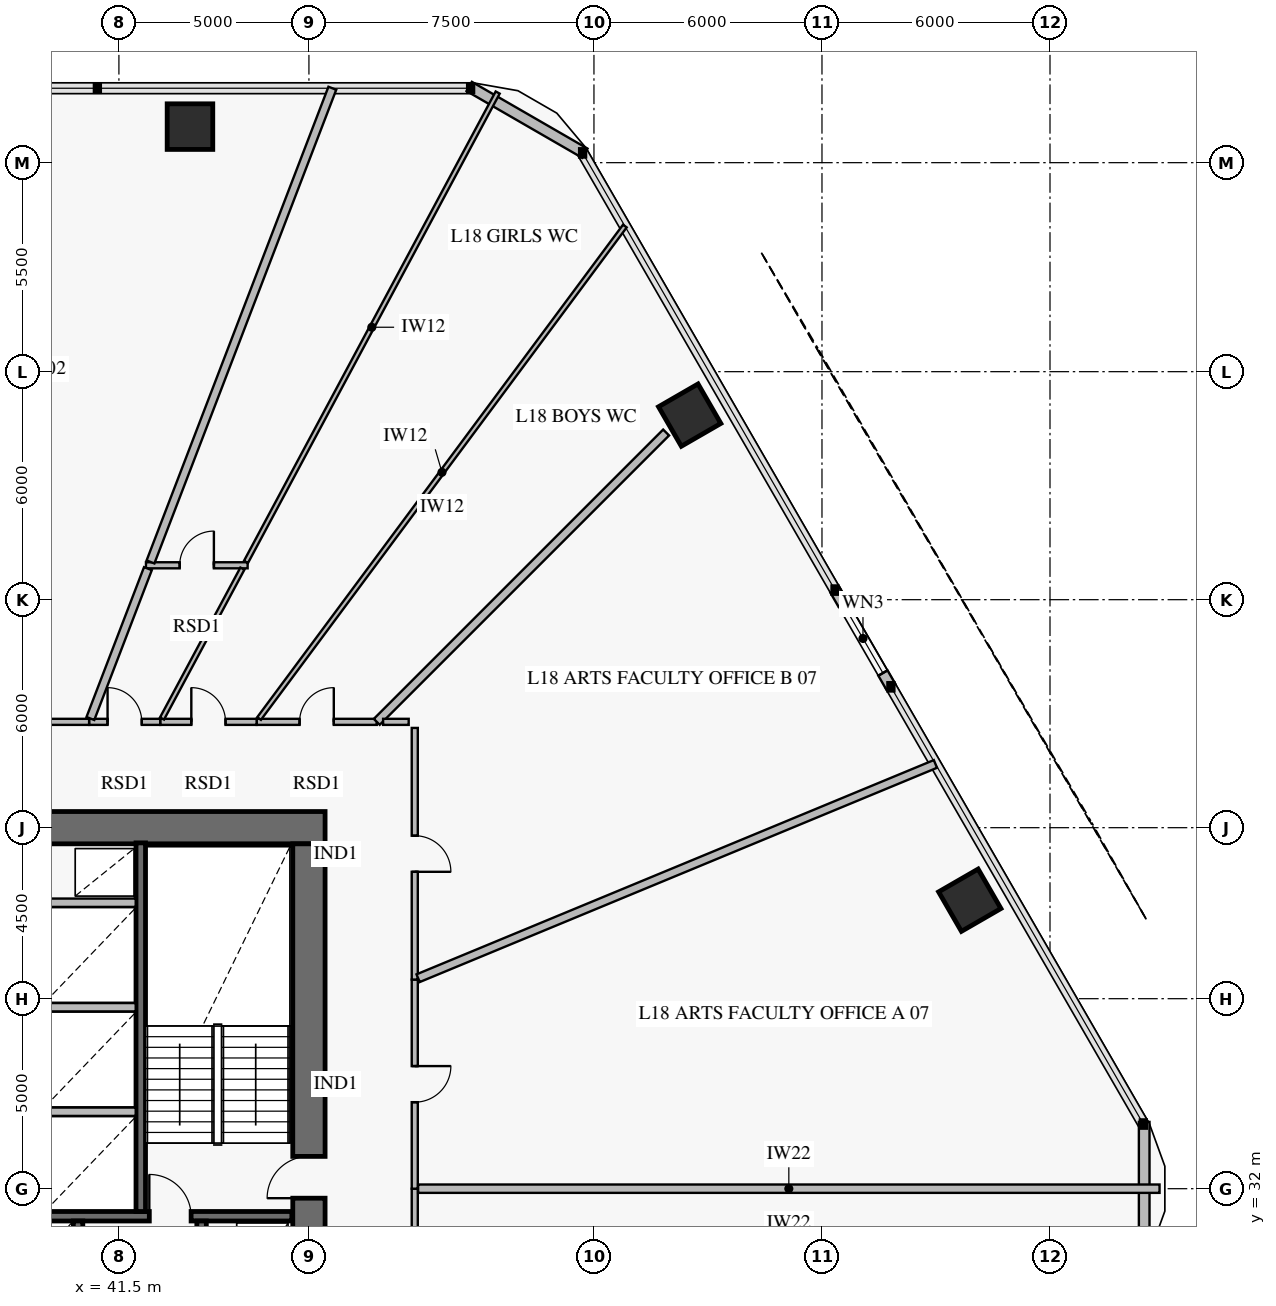
"""IFC4 building model, lengths in metres.
Left out: names, types, materials, properties, quantities, classifications, styles, units other than length and angle.
Written with IfcOpenShell. Run it as: python <this file> out.ifc"""

import sys

from ifc_helpers import new_model, si_unit, direction, frame, frame_2d, origin, origin_2d, place, context, subcontext, project, spatial, rectangle, extrude, element, fill, save


model = new_model("IFC4")
c1 = context("Model", 3, precision=1e-05, world=origin(), true_north=direction((0.0, 1.0)))
c2 = subcontext(c1, "Body", "Model", "MODEL_VIEW")
j1 = project(units=[si_unit("LENGTHUNIT", "METRE"), si_unit("PLANEANGLEUNIT", "RADIAN")], contexts=[c1])
p1 = place(None, origin())
s1 = spatial("IfcSite", under=j1, at=p1, CompositionType="ELEMENT")
p2 = place(p1, origin())
s2 = spatial("IfcBuilding", under=s1, at=p2, CompositionType="ELEMENT")
p3 = place(p2, frame((0.0, 0.0, 75.0)))
s3 = spatial("IfcBuildingStorey", under=s2, at=p3, CompositionType="ELEMENT", Elevation=75.0)
p4 = place(p3, frame((46.925, 41.5, 0.0), z_axis=(0.0, 0.0, 1.0), x_axis=(-1.0, 0.0, 0.0)))
e1 = element("IfcWall", 1, at=p4, inside=s3, PredefinedType="SHEAR", context=c2, shape_type="SweptSolid", body=[
    extrude(rectangle(XDim=7.975, YDim=0.85, at=frame_2d((3.988, 0.0))), origin(), (0.0, 0.0, 1.0), 4.2),
])
p5 = place(p3, frame((46.5, 22.925, 0.0), z_axis=(0.0, 0.0, 1.0), x_axis=(0.0, 1.0, 0.0)))
e2 = element("IfcWall", 2, at=p5, inside=s3, PredefinedType="SHEAR", context=c2, shape_type="SweptSolid", body=[
    extrude(rectangle(XDim=18.15, YDim=0.85, at=frame_2d((9.075, 0.0))), origin(), (0.0, 0.0, 1.0), 4.2),
])
p6 = place(p5, frame((8.825, 0.0, 0.0)))
e3 = element("IfcOpeningElement", 3, at=p6, cuts=e2, PredefinedType="OPENING", context=c2, shape_type="SweptSolid", body=[
    extrude(rectangle(XDim=1.1, YDim=2.15, at=frame_2d((0.55, 1.075))), frame((0.0, 0.437, 0.0), z_axis=(0.0, -1.0, 0.0), x_axis=(1.0, 0.0, 0.0)), (0.0, 0.0, 1.0), 0.874),
])
for number, where, z_axis, x_axis in (
    (4, (63.889, 39.592, 0.0), (0.0, 0.0, 1.0), (-0.5, 0.866, 0.0)),
    (5, (56.519, 52.357, 0.0), (0.0, 0.0, 1.0), (-0.5, 0.866, 0.0)),
    (6, (43.37, 59.948, 0.0), (0.0, 0.0, 1.0), (-1.0, 0.0, 0.0)),
):
    element("IfcColumn", number, at=place(p3, frame(where, z_axis=z_axis, x_axis=x_axis)), inside=s3, PredefinedType="COLUMN", context=c2, shape_type="SweptSolid", body=[
        extrude(rectangle(XDim=1.2, YDim=1.2, at=origin_2d()), origin(), (0.0, 0.0, 1.0), 3.92),
    ])
p7 = place(p3, frame((50.717, 61.006, 0.0), z_axis=(0.0, 0.0, 1.0), x_axis=(0.866007452331, -0.500031091541, 0.0)))
e7 = element("IfcWall", 7, at=p7, inside=s3, PredefinedType="SOLIDWALL", context=c2, shape_type="SweptSolid", body=[
    extrude(rectangle(XDim=3.515, YDim=0.28, at=frame_2d((1.757, 0.0))), origin(), (0.0, 0.0, 1.0), 3.92),
])
p8 = place(p3, frame((60.344, 47.752, 0.0), z_axis=(0.0, 0.0, 1.0), x_axis=(0.500024377727, -0.866011328839, 0.0)))
e8 = element("IfcWall", 8, at=p8, inside=s3, PredefinedType="SOLIDWALL", context=c2, shape_type="SweptSolid", body=[
    extrude(rectangle(XDim=2.94, YDim=0.28, at=frame_2d((1.47, 0.0))), origin(), (0.0, 0.0, 1.0), 3.92),
])
p9 = place(p8, frame((0.42, 0.0, 0.7)))
e9 = element("IfcOpeningElement", 9, at=p9, cuts=e8, PredefinedType="OPENING", context=c2, shape_type="SweptSolid", body=[
    extrude(rectangle(XDim=2.1, YDim=1.5, at=frame_2d((1.05, 0.75))), frame((0.0, 0.152, 0.0), z_axis=(0.0, -1.0, 0.0), x_axis=(1.0, 0.0, 0.0)), (0.0, 0.0, 1.0), 0.304),
])
p10 = place(p3, frame((68.479, 33.758, 0.0), z_axis=(0.0, 0.0, 1.0), x_axis=(0.0, -1.0, 0.0)))
e10 = element("IfcWall", 10, at=p10, inside=s3, PredefinedType="SOLIDWALL", context=c2, shape_type="SweptSolid", body=[
    extrude(rectangle(XDim=3.515, YDim=0.28, at=frame_2d((1.758, 0.0))), origin(), (0.0, 0.0, 1.0), 3.92),
])
p11 = place(p3, frame((25.95, 31.275, 0.0), z_axis=(0.0, 0.0, 1.0), x_axis=(1.0, 0.0, 0.0)))
e11 = element("IfcWall", 11, at=p11, inside=s3, PredefinedType="SOLIDWALL", context=c2, shape_type="SweptSolid", body=[
    extrude(rectangle(XDim=20.1, YDim=0.25, at=frame_2d((10.05, 0.0))), origin(), (0.0, 0.0, 1.0), 4.2),
])
p12 = place(p11, frame((2.6, 0.0, 0.0)))
e12 = element("IfcOpeningElement", 12, at=p12, cuts=e11, PredefinedType="OPENING", context=c2, shape_type="SweptSolid", body=[
    extrude(rectangle(XDim=1.1, YDim=2.15, at=frame_2d((0.55, 1.075))), frame((0.0, 0.137, 0.0), z_axis=(0.0, -1.0, 0.0), x_axis=(1.0, 0.0, 0.0)), (0.0, 0.0, 1.0), 0.274),
])
p13 = place(p11, frame((10.6, 0.0, 0.0)))
e13 = element("IfcOpeningElement", 13, at=p13, cuts=e11, PredefinedType="OPENING", context=c2, shape_type="SweptSolid", body=[
    extrude(rectangle(XDim=1.1, YDim=2.15, at=frame_2d((0.55, 1.075))), frame((0.0, 0.137, 0.0), z_axis=(0.0, -1.0, 0.0), x_axis=(1.0, 0.0, 0.0)), (0.0, 0.0, 1.0), 0.274),
])
p14 = place(p11, frame((16.35, 0.0, 0.0)))
e14 = element("IfcOpeningElement", 14, at=p14, cuts=e11, PredefinedType="OPENING", context=c2, shape_type="SweptSolid", body=[
    extrude(rectangle(XDim=1.1, YDim=2.15, at=frame_2d((0.55, 1.075))), frame((0.0, 0.137, 0.0), z_axis=(0.0, -1.0, 0.0), x_axis=(1.0, 0.0, 0.0)), (0.0, 0.0, 1.0), 0.274),
])
p15 = place(p3, frame((42.075, 31.4, 0.0), z_axis=(0.0, 0.0, 1.0), x_axis=(0.0, 1.0, 0.0)))
e15 = element("IfcWall", 15, at=p15, inside=s3, PredefinedType="SOLIDWALL", context=c2, shape_type="SweptSolid", body=[
    extrude(rectangle(XDim=9.7, YDim=0.25, at=frame_2d((4.85, 0.0))), origin(), (0.0, 0.0, 1.0), 4.2),
])
p16 = place(p3, frame((40.425, 22.95, 0.0), z_axis=(0.0, 0.0, 1.0), x_axis=(0.0, 1.0, 0.0)))
e16 = element("IfcWall", 16, at=p16, inside=s3, PredefinedType="SOLIDWALL", context=c2, shape_type="SweptSolid", body=[
    extrude(rectangle(XDim=8.2, YDim=0.25, at=frame_2d((4.1, 0.0))), origin(), (0.0, 0.0, 1.0), 4.2),
])
p17 = place(p3, frame((43.675, 22.95, 0.0), z_axis=(0.0, 0.0, 1.0), x_axis=(0.0, 1.0, 0.0)))
e17 = element("IfcWall", 17, at=p17, inside=s3, PredefinedType="SOLIDWALL", context=c2, shape_type="SweptSolid", body=[
    extrude(rectangle(XDim=8.2, YDim=0.25, at=frame_2d((4.1, 0.0))), origin(), (0.0, 0.0, 1.0), 4.2),
])
p18 = place(p17, frame((0.75, 0.0, 0.0)))
e18 = element("IfcOpeningElement", 18, at=p18, cuts=e17, PredefinedType="OPENING", context=c2, shape_type="SweptSolid", body=[
    extrude(rectangle(XDim=1.3, YDim=2.3, at=frame_2d((0.65, 1.15))), frame((0.0, 0.137, 0.0), z_axis=(0.0, -1.0, 0.0), x_axis=(1.0, 0.0, 0.0)), (0.0, 0.0, 1.0), 0.274),
])
p19 = place(p17, frame((3.7, 0.0, 0.0)))
e19 = element("IfcOpeningElement", 19, at=p19, cuts=e17, PredefinedType="OPENING", context=c2, shape_type="SweptSolid", body=[
    extrude(rectangle(XDim=1.3, YDim=2.3, at=frame_2d((0.65, 1.15))), frame((0.0, 0.137, 0.0), z_axis=(0.0, -1.0, 0.0), x_axis=(1.0, 0.0, 0.0)), (0.0, 0.0, 1.0), 0.274),
])
p20 = place(p17, frame((6.62, 0.0, 0.0)))
e20 = element("IfcOpeningElement", 20, at=p20, cuts=e17, PredefinedType="OPENING", context=c2, shape_type="SweptSolid", body=[
    extrude(rectangle(XDim=0.9, YDim=2.1, at=frame_2d((0.45, 1.05))), frame((0.0, 0.137, 0.0), z_axis=(0.0, -1.0, 0.0), x_axis=(1.0, 0.0, 0.0)), (0.0, 0.0, 1.0), 0.274),
])
p21 = place(p3, frame((48.285, 44.285, 0.0), z_axis=(0.0, 0.0, 1.0), x_axis=(-1.0, 0.0, 0.0)))
e21 = element("IfcWall", 21, at=p21, inside=s3, PredefinedType="PARTITIONING", context=c2, shape_type="SweptSolid", body=[
    extrude(rectangle(XDim=3.161, YDim=0.16, at=frame_2d((1.581, 0.0))), origin(), (0.0, 0.0, 1.0), 3.22),
])
p22 = place(p21, frame((1.131, 0.0, 0.0)))
e22 = element("IfcOpeningElement", 22, at=p22, cuts=e21, PredefinedType="OPENING", context=c2, shape_type="SweptSolid", body=[
    extrude(rectangle(XDim=0.9, YDim=2.1, at=frame_2d((0.45, 1.05))), frame((0.0, 0.092, 0.0), z_axis=(0.0, -1.0, 0.0), x_axis=(1.0, 0.0, 0.0)), (0.0, 0.0, 1.0), 0.184),
])
p23 = place(p3, frame((45.124, 44.285, 0.0), z_axis=(0.0, 0.0, 1.0), x_axis=(-1.0, 0.0, 0.0)))
e23 = element("IfcWall", 23, at=p23, inside=s3, PredefinedType="PARTITIONING", context=c2, shape_type="SweptSolid", body=[
    extrude(rectangle(XDim=2.536, YDim=0.16, at=frame_2d((1.268, 0.0))), origin(), (0.0, 0.0, 1.0), 3.92),
])
p24 = place(p23, frame((0.818, 0.0, 0.0)))
e24 = element("IfcOpeningElement", 24, at=p24, cuts=e23, PredefinedType="OPENING", context=c2, shape_type="SweptSolid", body=[
    extrude(rectangle(XDim=0.9, YDim=2.1, at=frame_2d((0.45, 1.05))), frame((0.0, 0.092, 0.0), z_axis=(0.0, -1.0, 0.0), x_axis=(1.0, 0.0, 0.0)), (0.0, 0.0, 1.0), 0.184),
])
p25 = place(p3, frame((42.212, 48.405, 0.0), z_axis=(0.0, 0.0, 1.0), x_axis=(1.0, 0.0, 0.0)))
e25 = element("IfcWall", 25, at=p25, inside=s3, PredefinedType="PARTITIONING", context=c2, shape_type="SweptSolid", body=[
    extrude(rectangle(XDim=2.676, YDim=0.16, at=frame_2d((1.338, 0.0))), origin(), (0.0, 0.0, 1.0), 3.92),
])
p26 = place(p25, frame((0.888, 0.0, 0.0)))
e26 = element("IfcOpeningElement", 26, at=p26, cuts=e25, PredefinedType="OPENING", context=c2, shape_type="SweptSolid", body=[
    extrude(rectangle(XDim=0.9, YDim=2.1, at=frame_2d((0.45, 1.05))), frame((0.0, 0.092, 0.0), z_axis=(0.0, -1.0, 0.0), x_axis=(1.0, 0.0, 0.0)), (0.0, 0.0, 1.0), 0.184),
])
p27 = place(p3, frame((42.587, 44.285, 0.0), z_axis=(0.0, 0.0, 1.0), x_axis=(-1.0, 0.0, 0.0)))
e27 = element("IfcWall", 27, at=p27, inside=s3, PredefinedType="PARTITIONING", context=c2, shape_type="SweptSolid", body=[
    extrude(rectangle(XDim=1.871, YDim=0.16, at=frame_2d((0.936, 0.0))), origin(), (0.0, 0.0, 1.0), 3.92),
])
p28 = place(p27, frame((0.486, 0.0, 0.0)))
e28 = element("IfcOpeningElement", 28, at=p28, cuts=e27, PredefinedType="OPENING", context=c2, shape_type="SweptSolid", body=[
    extrude(rectangle(XDim=0.9, YDim=2.1, at=frame_2d((0.45, 1.05))), frame((0.0, 0.092, 0.0), z_axis=(0.0, -1.0, 0.0), x_axis=(1.0, 0.0, 0.0)), (0.0, 0.0, 1.0), 0.184),
])
p29 = place(p3, frame((40.716, 44.285, 0.0), z_axis=(0.0, 0.0, 1.0), x_axis=(-1.0, 0.0, 0.0)))
e29 = element("IfcWall", 29, at=p29, inside=s3, PredefinedType="PARTITIONING", context=c2, shape_type="SweptSolid", body=[
    extrude(rectangle(XDim=11.809, YDim=0.16, at=frame_2d((5.904, 0.0))), origin(), (0.0, 0.0, 1.0), 3.22),
])
p30 = place(p29, frame((5.154, 0.0, 0.0)))
e30 = element("IfcOpeningElement", 30, at=p30, cuts=e29, PredefinedType="OPENING", context=c2, shape_type="SweptSolid", body=[
    extrude(rectangle(XDim=1.5, YDim=2.15, at=frame_2d((0.75, 1.075))), frame((0.0, 0.092, 0.0), z_axis=(0.0, -1.0, 0.0), x_axis=(1.0, 0.0, 0.0)), (0.0, 0.0, 1.0), 0.184),
])
p31 = place(p3, frame((49.285, 26.497, 0.0), z_axis=(0.0, 0.0, 1.0), x_axis=(0.0, 1.0, 0.0)))
e31 = element("IfcWall", 31, at=p31, inside=s3, PredefinedType="PARTITIONING", context=c2, shape_type="SweptSolid", body=[
    extrude(rectangle(XDim=5.503, YDim=0.16, at=frame_2d((2.751, 0.0))), origin(), (0.0, 0.0, 1.0), 3.22),
])
p32 = place(p31, frame((2.276, 0.0, 0.0)))
e32 = element("IfcOpeningElement", 32, at=p32, cuts=e31, PredefinedType="OPENING", context=c2, shape_type="SweptSolid", body=[
    extrude(rectangle(XDim=0.95, YDim=2.1, at=frame_2d((0.475, 1.05))), frame((0.0, 0.092, 0.0), z_axis=(0.0, -1.0, 0.0), x_axis=(1.0, 0.0, 0.0)), (0.0, 0.0, 1.0), 0.184),
])
p33 = place(p3, frame((49.285, 32.0, 0.0), z_axis=(0.0, 0.0, 1.0), x_axis=(0.0, 1.0, 0.0)))
e33 = element("IfcWall", 33, at=p33, inside=s3, PredefinedType="PARTITIONING", context=c2, shape_type="SweptSolid", body=[
    extrude(rectangle(XDim=5.503, YDim=0.16, at=frame_2d((2.751, 0.0))), origin(), (0.0, 0.0, 1.0), 3.22),
])
p34 = place(p33, frame((2.276, 0.0, 0.0)))
e34 = element("IfcOpeningElement", 34, at=p34, cuts=e33, PredefinedType="OPENING", context=c2, shape_type="SweptSolid", body=[
    extrude(rectangle(XDim=0.95, YDim=2.1, at=frame_2d((0.475, 1.05))), frame((0.0, 0.092, 0.0), z_axis=(0.0, -1.0, 0.0), x_axis=(1.0, 0.0, 0.0)), (0.0, 0.0, 1.0), 0.184),
])
p35 = place(p3, frame((49.285, 37.503, 0.0), z_axis=(0.0, 0.0, 1.0), x_axis=(0.0, 1.0, 0.0)))
e35 = element("IfcWall", 35, at=p35, inside=s3, PredefinedType="PARTITIONING", context=c2, shape_type="SweptSolid", body=[
    extrude(rectangle(XDim=6.622, YDim=0.16, at=frame_2d((3.311, 0.0))), origin(), (0.0, 0.0, 1.0), 3.92),
])
p36 = place(p35, frame((2.836, 0.0, 0.0)))
e36 = element("IfcOpeningElement", 36, at=p36, cuts=e35, PredefinedType="OPENING", context=c2, shape_type="SweptSolid", body=[
    extrude(rectangle(XDim=0.95, YDim=2.1, at=frame_2d((0.475, 1.05))), frame((0.0, 0.092, 0.0), z_axis=(0.0, -1.0, 0.0), x_axis=(1.0, 0.0, 0.0)), (0.0, 0.0, 1.0), 0.184),
])
for number, where, z_axis, x_axis in (
    (37, (39.558, 34.025, 0.0), (0.0, 0.0, 1.0), (1.0, 0.0, 0.0)),
    (38, (39.558, 36.775, 0.0), (0.0, 0.0, 1.0), (1.0, 0.0, 0.0)),
    (39, (39.558, 39.525, 0.0), (0.0, 0.0, 1.0), (1.0, 0.0, 0.0)),
):
    element("IfcWall", number, at=place(p3, frame(where, z_axis=z_axis, x_axis=x_axis)), inside=s3, PredefinedType="PARTITIONING", context=c2, shape_type="SweptSolid", body=[
        extrude(rectangle(XDim=2.384, YDim=0.22, at=frame_2d((1.192, 0.0))), origin(), (0.0, 0.0, 1.0), 3.92),
    ])
p37 = place(p3, frame((48.285, 44.285, 0.0), z_axis=(0.0, 0.0, 1.0), x_axis=(0.707106781187, 0.707106781187, 0.0)))
e40 = element("IfcWall", 40, at=p37, inside=s3, PredefinedType="PARTITIONING", context=c2, shape_type="SweptSolid", body=[
    extrude(rectangle(XDim=10.768, YDim=0.22, at=frame_2d((5.384, 0.0))), origin(), (0.0, 0.0, 1.0), 3.22),
])
p38 = place(p3, frame((45.189, 44.373, 0.0), z_axis=(0.0, 0.0, 1.0), x_axis=(0.596225418148, 0.802817071788, 0.0)))
e41 = element("IfcWall", 41, at=p38, inside=s3, PredefinedType="PARTITIONING", context=c2, shape_type="SweptSolid", body=[
    extrude(rectangle(XDim=16.142, YDim=0.12, at=frame_2d((8.071, 0.0))), origin(), (0.0, 0.0, 1.0), 3.17),
])
p39 = place(p3, frame((42.634, 44.373, 0.0), z_axis=(0.0, 0.0, 1.0), x_axis=(0.472563527557, 0.881296608653, 0.0)))
e42 = element("IfcWall", 42, at=p39, inside=s3, PredefinedType="PARTITIONING", context=c2, shape_type="SweptSolid", body=[
    extrude(rectangle(XDim=4.475, YDim=0.12, at=frame_2d((2.238, 0.0))), origin(), (0.0, 0.0, 1.0), 3.92),
])
p40 = place(p3, frame((44.844, 48.493, 0.0), z_axis=(0.0, 0.0, 1.0), x_axis=(0.472553457508, 0.881302008279, 0.0)))
e43 = element("IfcWall", 43, at=p40, inside=s3, PredefinedType="PARTITIONING", context=c2, shape_type="SweptSolid", body=[
    extrude(rectangle(XDim=14.016, YDim=0.12, at=frame_2d((7.008, 0.0))), origin(), (0.0, 0.0, 1.0), 3.17),
])
p41 = place(p3, frame((40.75, 44.373, 0.0), z_axis=(0.0, 0.0, 1.0), x_axis=(0.358370990804, 0.933579259062, 0.0)))
e44 = element("IfcWall", 44, at=p41, inside=s3, PredefinedType="PARTITIONING", context=c2, shape_type="SweptSolid", body=[
    extrude(rectangle(XDim=4.224, YDim=0.22, at=frame_2d((2.112, 0.0))), origin(), (0.0, 0.0, 1.0), 3.92),
])
p42 = place(p3, frame((42.331, 48.493, 0.0), z_axis=(0.0, 0.0, 1.0), x_axis=(0.358372511013, 0.933578675501, 0.0)))
e45 = element("IfcWall", 45, at=p42, inside=s3, PredefinedType="PARTITIONING", context=c2, shape_type="SweptSolid", body=[
    extrude(rectangle(XDim=13.353, YDim=0.22, at=frame_2d((6.676, 0.0))), origin(), (0.0, 0.0, 1.0), 3.17),
])
p43 = place(p3, frame((49.373, 32.0, 0.0), z_axis=(0.0, 0.0, 1.0), x_axis=(1.0, 0.0, 0.0)))
e46 = element("IfcWall", 46, at=p43, inside=s3, PredefinedType="PARTITIONING", context=c2, shape_type="SweptSolid", body=[
    extrude(rectangle(XDim=19.509, YDim=0.22, at=frame_2d((9.755, 0.0))), origin(), (0.0, 0.0, 1.0), 3.17),
])
p44 = place(p3, frame((49.373, 37.539, 0.0), z_axis=(0.0, 0.0, 1.0), x_axis=(0.923882327997, 0.382676683396, 0.0)))
e47 = element("IfcWall", 47, at=p44, inside=s3, PredefinedType="PARTITIONING", context=c2, shape_type="SweptSolid", body=[
    extrude(rectangle(XDim=14.734, YDim=0.22, at=frame_2d((7.367, 0.0))), origin(), (0.0, 0.0, 1.0), 3.17),
])
p45 = place(p3, frame((49.125, 44.285, 0.0), z_axis=(0.0, 0.0, 1.0), x_axis=(-1.0, 0.0, 0.0)))
e48 = element("IfcWall", 48, at=p45, inside=s3, PredefinedType="PARTITIONING", context=c2, shape_type="SweptSolid", body=[
    extrude(rectangle(XDim=0.673, YDim=0.16, at=frame_2d((0.336, 0.0))), origin(), (0.0, 0.0, 1.0), 3.22),
])
p46 = place(p9, origin())
e49 = element("IfcWindow", 49, at=p46, inside=s3, PartitioningType="SINGLE_PANEL", PredefinedType="WINDOW", context=c2, shape_type="SweptSolid", body=[
    extrude(rectangle(XDim=2.1, YDim=1.5, at=frame_2d((1.05, 0.75))), frame((0.0, 0.03, 0.0), z_axis=(0.0, -1.0, 0.0), x_axis=(1.0, 0.0, 0.0)), (0.0, 0.0, 1.0), 0.06),
])
fill(e9, e49)
p47 = place(p6, origin())
e50 = element("IfcDoor", 50, at=p47, inside=s3, OperationType="SINGLE_SWING_LEFT", PredefinedType="USERDEFINED", context=c2, shape_type="SweptSolid", body=[
    extrude(rectangle(XDim=1.1, YDim=2.15, at=frame_2d((0.55, 1.075))), frame((0.0, 0.025, 0.0), z_axis=(0.0, -1.0, 0.0), x_axis=(1.0, 0.0, 0.0)), (0.0, 0.0, 1.0), 0.05),
])
fill(e3, e50)
p48 = place(p14, origin())
e51 = element("IfcDoor", 51, at=p48, inside=s3, OperationType="SINGLE_SWING_LEFT", PredefinedType="USERDEFINED", context=c2, shape_type="SweptSolid", body=[
    extrude(rectangle(XDim=1.1, YDim=2.15, at=frame_2d((0.55, 1.075))), frame((0.0, 0.025, 0.0), z_axis=(0.0, -1.0, 0.0), x_axis=(1.0, 0.0, 0.0)), (0.0, 0.0, 1.0), 0.05),
])
fill(e14, e51)
p49 = place(p22, frame((0.9, 0.0, 0.0), z_axis=(0.0, 0.0, 1.0), x_axis=(-1.0, 0.0, 0.0)))
e52 = element("IfcDoor", 52, at=p49, inside=s3, OperationType="SINGLE_SWING_RIGHT", PredefinedType="DOOR", context=c2, shape_type="SweptSolid", body=[
    extrude(rectangle(XDim=0.9, YDim=2.1, at=frame_2d((0.45, 1.05))), frame((0.0, 0.025, 0.0), z_axis=(0.0, -1.0, 0.0), x_axis=(1.0, 0.0, 0.0)), (0.0, 0.0, 1.0), 0.05),
])
fill(e22, e52)
p50 = place(p24, frame((0.9, 0.0, 0.0), z_axis=(0.0, 0.0, 1.0), x_axis=(-1.0, 0.0, 0.0)))
e53 = element("IfcDoor", 53, at=p50, inside=s3, OperationType="SINGLE_SWING_LEFT", PredefinedType="DOOR", context=c2, shape_type="SweptSolid", body=[
    extrude(rectangle(XDim=0.9, YDim=2.1, at=frame_2d((0.45, 1.05))), frame((0.0, 0.025, 0.0), z_axis=(0.0, -1.0, 0.0), x_axis=(1.0, 0.0, 0.0)), (0.0, 0.0, 1.0), 0.05),
])
fill(e24, e53)
p51 = place(p26, origin())
e54 = element("IfcDoor", 54, at=p51, inside=s3, OperationType="SINGLE_SWING_RIGHT", PredefinedType="DOOR", context=c2, shape_type="SweptSolid", body=[
    extrude(rectangle(XDim=0.9, YDim=2.1, at=frame_2d((0.45, 1.05))), frame((0.0, 0.025, 0.0), z_axis=(0.0, -1.0, 0.0), x_axis=(1.0, 0.0, 0.0)), (0.0, 0.0, 1.0), 0.05),
])
fill(e26, e54)
p52 = place(p28, frame((0.9, 0.0, 0.0), z_axis=(0.0, 0.0, 1.0), x_axis=(-1.0, 0.0, 0.0)))
e55 = element("IfcDoor", 55, at=p52, inside=s3, OperationType="SINGLE_SWING_LEFT", PredefinedType="DOOR", context=c2, shape_type="SweptSolid", body=[
    extrude(rectangle(XDim=0.9, YDim=2.1, at=frame_2d((0.45, 1.05))), frame((0.0, 0.025, 0.0), z_axis=(0.0, -1.0, 0.0), x_axis=(1.0, 0.0, 0.0)), (0.0, 0.0, 1.0), 0.05),
])
fill(e28, e55)
p53 = place(p34, frame((0.95, 0.0, 0.0), z_axis=(0.0, 0.0, 1.0), x_axis=(-1.0, 0.0, 0.0)))
e56 = element("IfcDoor", 56, at=p53, inside=s3, OperationType="SINGLE_SWING_LEFT", PredefinedType="DOOR", context=c2, shape_type="SweptSolid", body=[
    extrude(rectangle(XDim=0.95, YDim=2.1, at=frame_2d((0.475, 1.05))), frame((0.0, 0.025, 0.0), z_axis=(0.0, -1.0, 0.0), x_axis=(1.0, 0.0, 0.0)), (0.0, 0.0, 1.0), 0.05),
])
fill(e34, e56)
p54 = place(p36, frame((0.95, 0.0, 0.0), z_axis=(0.0, 0.0, 1.0), x_axis=(-1.0, 0.0, 0.0)))
e57 = element("IfcDoor", 57, at=p54, inside=s3, OperationType="SINGLE_SWING_RIGHT", PredefinedType="DOOR", context=c2, shape_type="SweptSolid", body=[
    extrude(rectangle(XDim=0.95, YDim=2.1, at=frame_2d((0.475, 1.05))), frame((0.0, 0.025, 0.0), z_axis=(0.0, -1.0, 0.0), x_axis=(1.0, 0.0, 0.0)), (0.0, 0.0, 1.0), 0.05),
])
fill(e36, e57)
save(model, sys.argv[1])
